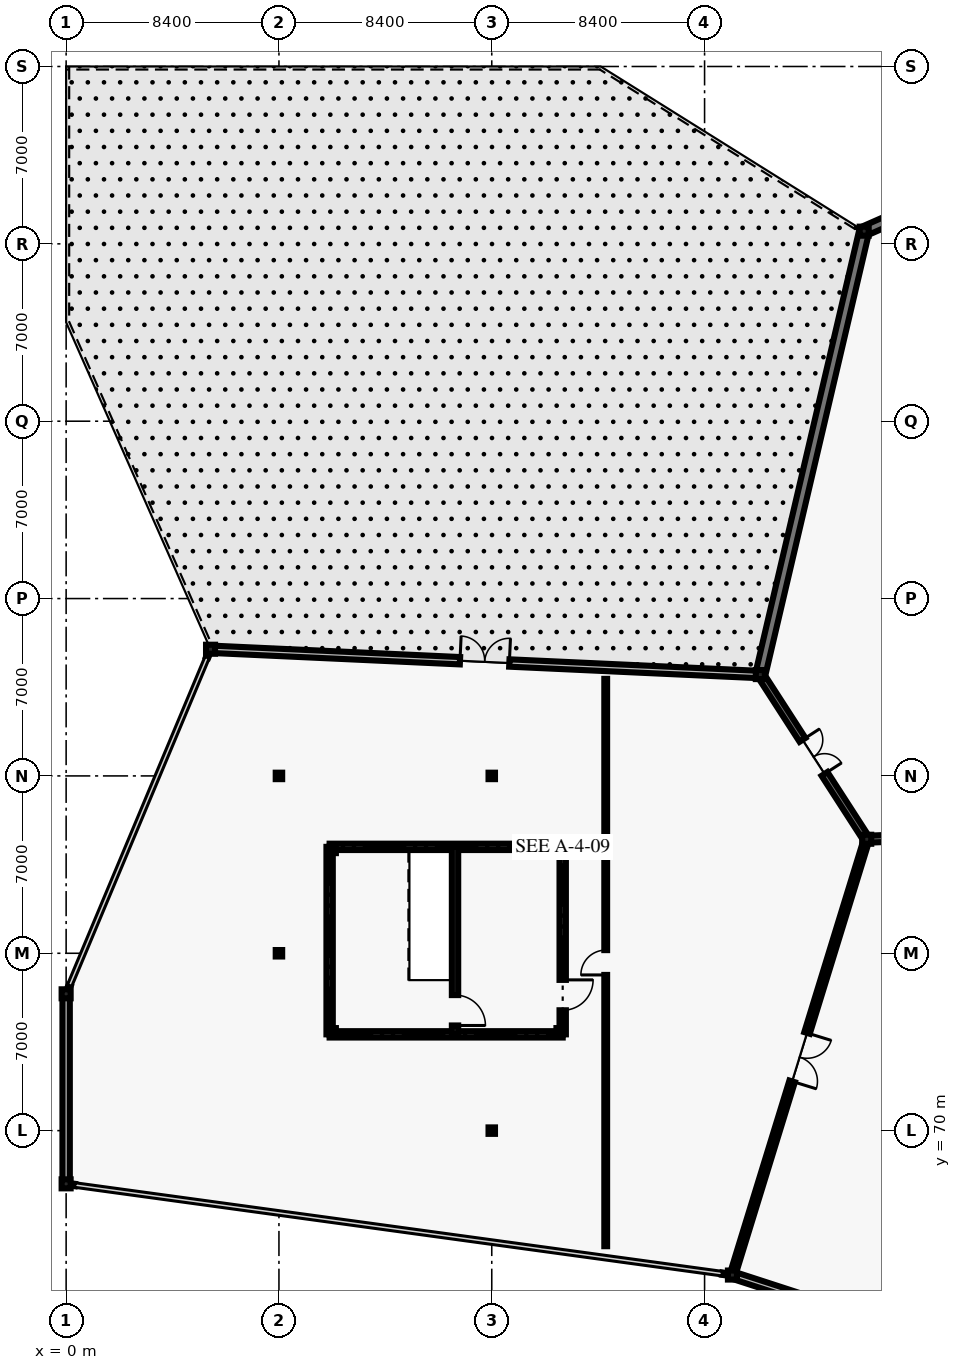
"""IFC4 building model, lengths in metres.
Left out: names, types, materials, properties, quantities, classifications, styles, units other than length and angle.
Written with IfcOpenShell. Run it as: python <this file> out.ifc"""

import sys

from ifc_helpers import new_model, si_unit, direction, frame, frame_2d, origin, origin_2d, place, context, subcontext, project, spatial, rectangle, hollow_circle, i_section, extrude, element, fill, save


model = new_model("IFC4")
c1 = context("Model", 3, precision=1e-05, world=origin(), true_north=direction((0.0, 1.0)))
c2 = subcontext(c1, "Body", "Model", "MODEL_VIEW")
j1 = project(units=[si_unit("LENGTHUNIT", "METRE"), si_unit("PLANEANGLEUNIT", "RADIAN")], contexts=[c1])
p1 = place(None, origin())
s1 = spatial("IfcSite", under=j1, at=p1, CompositionType="ELEMENT")
p2 = place(p1, origin())
s2 = spatial("IfcBuilding", under=s1, at=p2, CompositionType="ELEMENT")
p3 = place(p2, frame((0.0, 0.0, 10.2)))
s3 = spatial("IfcBuildingStorey", under=s2, at=p3, CompositionType="ELEMENT", Elevation=10.2)
for number, where, z_axis, x_axis in (
    (1, (0.0, 67.9, 0.0), (0.0, 0.0, 1.0), (1.0, 0.0, 0.0)),
    (2, (0.0, 75.4, 0.0), (0.0, 0.0, 1.0), (1.0, 0.0, 0.0)),
    (3, (5.7, 89.0, 0.0), (0.0, 0.0, 1.0), (1.0, 0.0, 0.0)),
    (4, (26.3, 64.3, 0.0), (0.0, 0.0, 1.0), (1.0, 0.0, 0.0)),
    (5, (27.4, 88.0, 0.0), (0.0, 0.0, 1.0), (1.0, 0.0, 0.0)),
    (6, (31.5, 105.5, 0.0), (0.0, 0.0, 1.0), (1.0, 0.0, 0.0)),
    (7, (31.6, 81.5, 0.0), (0.0, 0.0, 1.0), (1.0, 0.0, 0.0)),
):
    element("IfcColumn", number, at=place(p3, frame(where, z_axis=z_axis, x_axis=x_axis)), inside=s3, PredefinedType="COLUMN", context=c2, shape_type="SweptSolid", body=[
        extrude(hollow_circle(Radius=0.178, WallThickness=0.013, at=origin_2d()), origin(), (0.0, 0.0, 1.0), 4.8),
    ])
for number, where, z_axis, x_axis in (
    (8, (8.4, 77.0, 0.0), (0.0, 0.0, 1.0), (1.0, 0.0, 0.0)),
    (9, (8.4, 84.0, 0.0), (0.0, 0.0, 1.0), (1.0, 0.0, 0.0)),
    (10, (16.8, 70.0, 0.0), (0.0, 0.0, 1.0), (1.0, 0.0, 0.0)),
    (11, (16.8, 84.0, 0.0), (0.0, 0.0, 1.0), (1.0, 0.0, 0.0)),
    (12, (10.52, 73.92, 0.0), (0.0, 0.0, 1.0), (1.0, 0.0, 0.0)),
    (13, (19.48, 73.92, 0.0), (0.0, 0.0, 1.0), (1.0, 0.0, 0.0)),
    (14, (19.48, 81.08, 0.0), (0.0, 0.0, 1.0), (1.0, 0.0, 0.0)),
    (15, (10.52, 81.08, 0.0), (0.0, 0.0, 1.0), (1.0, 0.0, 0.0)),
):
    element("IfcColumn", number, at=place(p3, frame(where, z_axis=z_axis, x_axis=x_axis)), inside=s3, PredefinedType="COLUMN", context=c2, shape_type="SweptSolid", body=[
        extrude(i_section(OverallWidth=0.254, OverallDepth=0.254, WebThickness=0.009, FlangeThickness=0.014, FilletRadius=0.013, at=origin_2d()), origin(), (0.0, 0.0, 1.0), 4.8),
    ])
p4 = place(p3, frame((49.943, 56.619, 0.0), z_axis=(0.0, 0.0, 1.0), x_axis=(-0.951074357174, 0.308962080402, 0.0)))
e16 = element("IfcWall", 16, at=p4, inside=s3, PredefinedType="SOLIDWALL", context=c2, shape_type="SweptSolid", body=[
    extrude(rectangle(XDim=24.8, YDim=0.29, at=frame_2d((12.4, 0.0))), origin(), (0.0, 0.0, 1.0), 3.62),
])
p5 = place(p3, frame((31.5, 105.5, 0.0), z_axis=(0.0, 0.0, 1.0), x_axis=(0.915568057854, 0.40216306573, 0.0)))
e17 = element("IfcWall", 17, at=p5, inside=s3, PredefinedType="SOLIDWALL", context=c2, shape_type="SweptSolid", body=[
    extrude(rectangle(XDim=11.687, YDim=0.4, at=frame_2d((5.843, 0.0))), origin(), (0.0, 0.0, 1.0), 3.62),
])
p6 = place(p3, frame((27.414, 88.058, 0.0), z_axis=(0.0, 0.0, 1.0), x_axis=(0.228085145328, 0.973641189803, 0.0)))
e18 = element("IfcWall", 18, at=p6, inside=s3, PredefinedType="SOLIDWALL", context=c2, shape_type="SweptSolid", body=[
    extrude(rectangle(XDim=17.914, YDim=0.4, at=frame_2d((8.957, 0.0))), origin(), (0.0, 0.0, 1.0), 3.62),
])
p7 = place(p3, frame((0.0, 67.9, 0.0), z_axis=(0.0, 0.0, 1.0), x_axis=(0.0, 1.0, 0.0)))
e19 = element("IfcWall", 19, at=p7, inside=s3, PredefinedType="SOLIDWALL", context=c2, shape_type="SweptSolid", body=[
    extrude(rectangle(XDim=7.5, YDim=0.29, at=frame_2d((3.75, 0.0))), origin(), (0.0, 0.0, 1.0), 3.62),
])
for number, where, z_axis, x_axis in (
    (20, (26.199, 64.314, 0.0), (0.0, 0.0, 1.0), (-0.991, 0.133, 0.0)),
    (21, (0.347, 67.853, 0.0), (0.0, 0.0, 1.0), (-0.991, 0.133, 0.0)),
):
    element("IfcWall", number, at=place(p3, frame(where, z_axis=z_axis, x_axis=x_axis)), inside=s3, PredefinedType="SOLIDWALL", context=c2, shape_type="SweptSolid", body=[
        extrude(rectangle(XDim=0.308, YDim=0.095, at=frame_2d((0.154, 0.0))), origin(), (0.0, 0.0, 1.0), 3.62),
    ])
p8 = place(p3, frame((5.7, 89.0, 0.0), z_axis=(0.0, 0.0, 1.0), x_axis=(0.998940232076, -0.046026217963, 0.0)))
e22 = element("IfcWall", 22, at=p8, inside=s3, PredefinedType="SOLIDWALL", context=c2, shape_type="SweptSolid", body=[
    extrude(rectangle(XDim=21.663, YDim=0.29, at=frame_2d((10.832, 0.0))), origin(), (0.0, 0.0, 1.0), 3.62),
])
p9 = place(p8, frame((9.856, 0.0, 0.0)))
e23 = element("IfcOpeningElement", 23, at=p9, cuts=e22, PredefinedType="OPENING", context=c2, shape_type="SweptSolid", body=[
    extrude(rectangle(XDim=1.95, YDim=2.3, at=frame_2d((0.975, 1.15))), frame((0.0, 0.155, 0.0), z_axis=(0.0, -1.0, 0.0), x_axis=(1.0, 0.0, 0.0)), (0.0, 0.0, 1.0), 0.31),
])
for number, where, z_axis, x_axis in (
    (24, (0.016, 75.439, 0.0), (0.0, 0.0, 1.0), (0.386, 0.922, 0.0)),
    (25, (5.565, 88.677, 0.0), (0.0, 0.0, 1.0), (0.387, 0.922, 0.0)),
):
    element("IfcWall", number, at=place(p3, frame(where, z_axis=z_axis, x_axis=x_axis)), inside=s3, PredefinedType="SOLIDWALL", context=c2, shape_type="SweptSolid", body=[
        extrude(rectangle(XDim=0.308, YDim=0.095, at=frame_2d((0.154, 0.0))), origin(), (0.0, 0.0, 1.0), 3.62),
    ])
p10 = place(p3, frame((57.8, 82.6, 0.0), z_axis=(0.0, 0.0, 1.0), x_axis=(-0.999119645224, -0.041951573605, 0.0)))
e26 = element("IfcWall", 26, at=p10, inside=s3, PredefinedType="SOLIDWALL", context=c2, shape_type="SweptSolid", body=[
    extrude(rectangle(XDim=26.223, YDim=0.275, at=frame_2d((13.112, 0.0))), origin(), (0.0, 0.0, 1.0), 4.02),
])
p11 = place(p10, frame((12.312, 0.0, 0.0)))
e27 = element("IfcOpeningElement", 27, at=p11, cuts=e26, PredefinedType="OPENING", context=c2, shape_type="SweptSolid", body=[
    extrude(rectangle(XDim=1.6, YDim=2.45, at=frame_2d((0.8, 1.225))), frame((0.0, 0.147, 0.0), z_axis=(0.0, -1.0, 0.0), x_axis=(1.0, 0.0, 0.0)), (0.0, 0.0, 1.0), 0.295),
])
p12 = place(p3, frame((31.6, 81.5, 0.0), z_axis=(0.0, 0.0, 1.0), x_axis=(-0.294479498062, -0.955657797133, 0.0)))
e28 = element("IfcWall", 28, at=p12, inside=s3, PredefinedType="SOLIDWALL", context=c2, shape_type="SweptSolid", body=[
    extrude(rectangle(XDim=17.998, YDim=0.225, at=frame_2d((8.999, 0.0))), origin(), (0.0, 0.0, 1.0), 4.02),
])
p13 = place(p12, frame((7.999, 0.0, 0.0)))
e29 = element("IfcOpeningElement", 29, at=p13, cuts=e28, PredefinedType="OPENING", context=c2, shape_type="SweptSolid", body=[
    extrude(rectangle(XDim=2.0, YDim=2.5, at=frame_2d((1.0, 1.25))), frame((0.0, 0.123, 0.0), z_axis=(0.0, -1.0, 0.0), x_axis=(1.0, 0.0, 0.0)), (0.0, 0.0, 1.0), 0.245),
])
p14 = place(p3, frame((27.4, 88.0, 0.0), z_axis=(0.0, 0.0, 1.0), x_axis=(0.542733189748, -0.839905164138, 0.0)))
e30 = element("IfcWall", 30, at=p14, inside=s3, PredefinedType="SOLIDWALL", context=c2, shape_type="SweptSolid", body=[
    extrude(rectangle(XDim=7.739, YDim=0.275, at=frame_2d((3.87, 0.0))), origin(), (0.0, 0.0, 1.0), 4.02),
])
p15 = place(p14, frame((3.069, 0.0, 0.0)))
e31 = element("IfcOpeningElement", 31, at=p15, cuts=e30, PredefinedType="OPENING", context=c2, shape_type="SweptSolid", body=[
    extrude(rectangle(XDim=1.6, YDim=2.45, at=frame_2d((0.8, 1.225))), frame((0.0, 0.147, 0.0), z_axis=(0.0, -1.0, 0.0), x_axis=(1.0, 0.0, 0.0)), (0.0, 0.0, 1.0), 0.295),
])
p16 = place(p3, frame((21.298, 65.439, 0.0), z_axis=(0.0, 0.0, 1.0), x_axis=(0.0, 1.0, 0.0)))
e32 = element("IfcWall", 32, at=p16, inside=s3, PredefinedType="PARTITIONING", context=c2, shape_type="SweptSolid", body=[
    extrude(rectangle(XDim=22.392, YDim=0.11, at=frame_2d((11.196, 0.0))), origin(), (0.0, 0.0, 1.0), 3.32),
])
p17 = place(p16, frame((10.706, 0.0, 0.0)))
e33 = element("IfcOpeningElement", 33, at=p17, cuts=e32, PredefinedType="OPENING", context=c2, shape_type="SweptSolid", body=[
    extrude(rectangle(XDim=0.98, YDim=2.15, at=frame_2d((0.49, 1.075))), frame((0.0, 0.065, 0.0), z_axis=(0.0, -1.0, 0.0), x_axis=(1.0, 0.0, 0.0)), (0.0, 0.0, 1.0), 0.13),
])
p18 = place(p3, frame((10.4, 73.8, 0.0), z_axis=(0.0, 0.0, 1.0), x_axis=(0.0, 1.0, 0.0)))
e34 = element("IfcWall", 34, at=p18, inside=s3, PredefinedType="SHEAR", context=c2, shape_type="SweptSolid", body=[
    extrude(rectangle(XDim=7.4, YDim=0.25, at=frame_2d((3.7, 0.0))), origin(), (0.0, 0.0, 1.0), 4.56),
])
for number, where, z_axis, x_axis in (
    (35, (10.4, 81.2, 0.0), (0.0, 0.0, 1.0), (1.0, 0.0, 0.0)),
    (36, (19.6, 73.8, 0.0), (0.0, 0.0, 1.0), (-1.0, 0.0, 0.0)),
):
    element("IfcWall", number, at=place(p3, frame(where, z_axis=z_axis, x_axis=x_axis)), inside=s3, PredefinedType="SHEAR", context=c2, shape_type="SweptSolid", body=[
        extrude(rectangle(XDim=9.2, YDim=0.25, at=frame_2d((4.6, 0.0))), origin(), (0.0, 0.0, 1.0), 4.56),
    ])
p19 = place(p3, frame((19.6, 81.2, 0.0), z_axis=(0.0, 0.0, 1.0), x_axis=(0.0, -1.0, 0.0)))
e37 = element("IfcWall", 37, at=p19, inside=s3, PredefinedType="SHEAR", context=c2, shape_type="SweptSolid", body=[
    extrude(rectangle(XDim=7.4, YDim=0.25, at=frame_2d((3.7, 0.0))), origin(), (0.0, 0.0, 1.0), 4.56),
])
p20 = place(p19, frame((5.25, 0.0, 0.0)))
e38 = element("IfcOpeningElement", 38, at=p20, cuts=e37, PredefinedType="OPENING", context=c2, shape_type="SweptSolid", body=[
    extrude(rectangle(XDim=1.2, YDim=2.2, at=frame_2d((0.6, 1.1))), frame((0.0, 0.135, 0.0), z_axis=(0.0, -1.0, 0.0), x_axis=(1.0, 0.0, 0.0)), (0.0, 0.0, 1.0), 0.27),
])
p21 = place(p3, frame((15.35, 81.2, 0.0), z_axis=(0.0, 0.0, 1.0), x_axis=(0.0, -1.0, 0.0)))
e39 = element("IfcWall", 39, at=p21, inside=s3, PredefinedType="SHEAR", context=c2, shape_type="SweptSolid", body=[
    extrude(rectangle(XDim=7.4, YDim=0.25, at=frame_2d((3.7, 0.0))), origin(), (0.0, 0.0, 1.0), 4.56),
])
p22 = place(p21, frame((5.85, 0.0, 0.0)))
e40 = element("IfcOpeningElement", 40, at=p22, cuts=e39, PredefinedType="OPENING", context=c2, shape_type="SweptSolid", body=[
    extrude(rectangle(XDim=1.2, YDim=2.2, at=frame_2d((0.6, 1.1))), frame((0.0, 0.135, 0.0), z_axis=(0.0, -1.0, 0.0), x_axis=(1.0, 0.0, 0.0)), (0.0, 0.0, 1.0), 0.27),
])
p23 = place(p9, origin())
e41 = element("IfcDoor", 41, at=p23, inside=s3, OperationType="DOUBLE_DOOR_SINGLE_SWING", PredefinedType="DOOR", context=c2, shape_type="SweptSolid", body=[
    extrude(rectangle(XDim=1.95, YDim=2.3, at=frame_2d((0.975, 1.15))), frame((0.0, 0.025, 0.0), z_axis=(0.0, -1.0, 0.0), x_axis=(1.0, 0.0, 0.0)), (0.0, 0.0, 1.0), 0.05),
])
fill(e23, e41)
p24 = place(p13, origin())
e42 = element("IfcDoor", 42, at=p24, inside=s3, OperationType="DOUBLE_DOOR_SINGLE_SWING", PredefinedType="DOOR", context=c2, shape_type="SweptSolid", body=[
    extrude(rectangle(XDim=2.0, YDim=2.5, at=frame_2d((1.0, 1.25))), frame((0.0, 0.025, 0.0), z_axis=(0.0, -1.0, 0.0), x_axis=(1.0, 0.0, 0.0)), (0.0, 0.0, 1.0), 0.05),
])
fill(e29, e42)
p25 = place(p15, origin())
e43 = element("IfcDoor", 43, at=p25, inside=s3, OperationType="DOUBLE_DOOR_SINGLE_SWING", PredefinedType="DOOR", context=c2, shape_type="SweptSolid", body=[
    extrude(rectangle(XDim=1.6, YDim=2.45, at=frame_2d((0.8, 1.225))), frame((0.0, 0.025, 0.0), z_axis=(0.0, -1.0, 0.0), x_axis=(1.0, 0.0, 0.0)), (0.0, 0.0, 1.0), 0.05),
])
fill(e31, e43)
p26 = place(p17, origin())
e44 = element("IfcDoor", 44, at=p26, inside=s3, OperationType="SINGLE_SWING_LEFT", PredefinedType="DOOR", context=c2, shape_type="SweptSolid", body=[
    extrude(rectangle(XDim=0.98, YDim=2.15, at=frame_2d((0.49, 1.075))), frame((0.0, 0.025, 0.0), z_axis=(0.0, -1.0, 0.0), x_axis=(1.0, 0.0, 0.0)), (0.0, 0.0, 1.0), 0.05),
])
fill(e33, e44)
p27 = place(p20, origin())
e45 = element("IfcDoor", 45, at=p27, inside=s3, OperationType="SINGLE_SWING_LEFT", PredefinedType="DOOR", context=c2, shape_type="SweptSolid", body=[
    extrude(rectangle(XDim=1.2, YDim=2.2, at=frame_2d((0.6, 1.1))), frame((0.0, 0.025, 0.0), z_axis=(0.0, -1.0, 0.0), x_axis=(1.0, 0.0, 0.0)), (0.0, 0.0, 1.0), 0.05),
])
fill(e38, e45)
p28 = place(p22, origin())
e46 = element("IfcDoor", 46, at=p28, inside=s3, OperationType="SINGLE_SWING_RIGHT", PredefinedType="DOOR", context=c2, shape_type="SweptSolid", body=[
    extrude(rectangle(XDim=1.2, YDim=2.2, at=frame_2d((0.6, 1.1))), frame((0.0, 0.025, 0.0), z_axis=(0.0, -1.0, 0.0), x_axis=(1.0, 0.0, 0.0)), (0.0, 0.0, 1.0), 0.05),
])
fill(e40, e46)
save(model, sys.argv[1])
